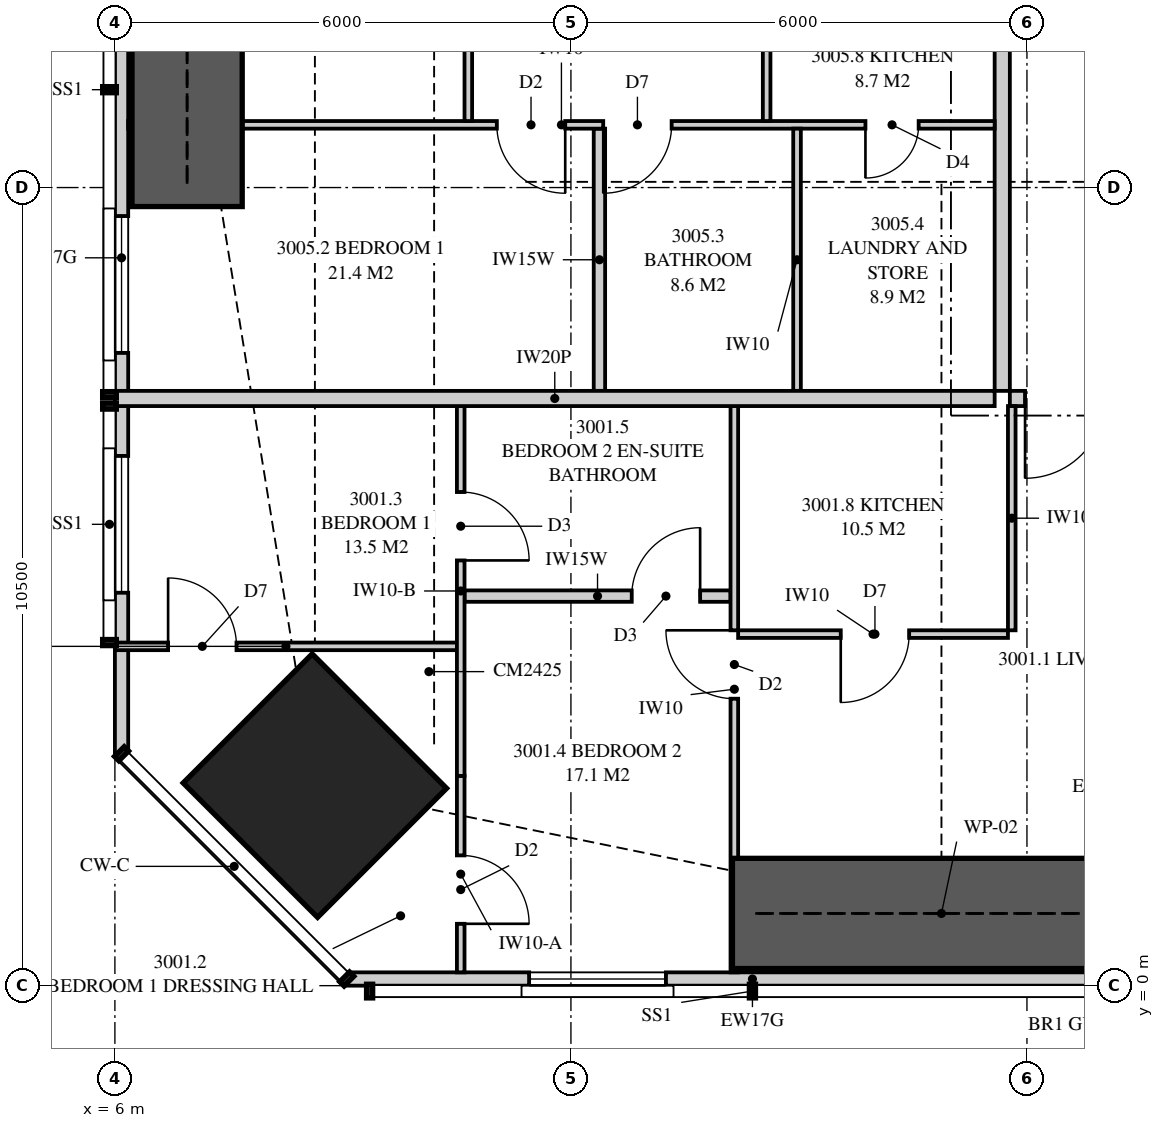
"""IFC4 building model, lengths in metres.
Left out: names, types, materials, properties, quantities, classifications, styles, units other than length and angle.
Written with IfcOpenShell. Run it as: python <this file> out.ifc"""

import sys

from ifc_helpers import new_model, si_unit, direction, frame, frame_2d, origin, origin_2d, place, context, subcontext, project, spatial, polyline, rectangle, outline, extrude, element, fill, save


model = new_model("IFC4")
c1 = context("Model", 3, precision=1e-05, world=origin(), true_north=direction((0.0, 1.0)))
c2 = subcontext(c1, "Body", "Model", "MODEL_VIEW")
j1 = project(units=[si_unit("LENGTHUNIT", "METRE"), si_unit("PLANEANGLEUNIT", "RADIAN")], contexts=[c1])
p1 = place(None, origin())
s1 = spatial("IfcSite", under=j1, at=p1, CompositionType="ELEMENT")
p2 = place(p1, origin())
s2 = spatial("IfcBuilding", under=s1, at=p2, CompositionType="ELEMENT")
p3 = place(p2, frame((0.0, 0.0, 111.55)))
s3 = spatial("IfcBuildingStorey", under=s2, at=p3, CompositionType="ELEMENT", Elevation=111.55)
p4 = place(p3, frame((8.631, 2.631, 0.0), z_axis=(0.0, 0.0, 1.0), x_axis=(0.707106781187, 0.707106781187, 0.0)))
e1 = element("IfcColumn", 1, at=p4, inside=s3, PredefinedType="COLUMN", context=c2, shape_type="SweptSolid", body=[
    extrude(rectangle(XDim=2.4, YDim=2.5, at=origin_2d()), origin(), (0.0, 0.0, 1.0), 3.35),
])
p5 = place(p3, frame((9.051, 0.087, 0.0), z_axis=(0.0, 0.0, 1.0), x_axis=(1.0, 0.0, 0.0)))
e2 = element("IfcWall", 2, at=p5, inside=s3, PredefinedType="SOLIDWALL", context=c2, shape_type="SweptSolid", body=[
    extrude(outline(polyline([(0.0, 0.0), (10.674, 0.0), (10.674, 2.15), (7.824, 2.15), (7.824, 3.11), (7.666, 3.11), (7.666, 2.15), (7.62, 2.15), (7.62, 3.11), (0.0, 3.11), (0.0, 0.0)])), frame((0.0, 0.087, 0.0), z_axis=(0.0, -1.0, 0.0), x_axis=(1.0, 0.0, 0.0)), (0.0, 0.0, 1.0), 0.175),
])
p6 = place(p5, frame((2.399, 0.0, 0.4)))
e3 = element("IfcOpeningElement", 3, at=p6, cuts=e2, PredefinedType="OPENING", context=c2, shape_type="SweptSolid", body=[
    extrude(rectangle(XDim=1.8, YDim=1.7, at=frame_2d((0.9, 0.85))), frame((0.0, 0.097, 0.0), z_axis=(0.0, -1.0, 0.0), x_axis=(1.0, 0.0, 0.0)), (0.0, 0.0, 1.0), 0.195),
])
p7 = place(p3, frame((6.087, 16.1, 0.0), z_axis=(0.0, 0.0, 1.0), x_axis=(0.0, -1.0, 0.0)))
e4 = element("IfcWall", 4, at=p7, inside=s3, PredefinedType="SOLIDWALL", context=c2, shape_type="SweptSolid", body=[
    extrude(outline(polyline([(0.0, 0.0), (13.049, 0.0), (13.049, 3.11), (3.319, 3.11), (3.319, 2.15), (3.226, 2.15), (3.226, 3.11), (3.1, 3.11), (3.1, 2.15), (0.0, 2.15), (0.0, 0.0)])), frame((0.0, 0.087, 0.0), z_axis=(0.0, -1.0, 0.0), x_axis=(1.0, 0.0, 0.0)), (0.0, 0.0, 1.0), 0.175),
])
p8 = place(p7, frame((5.975, 0.0, 0.4)))
e5 = element("IfcOpeningElement", 5, at=p8, cuts=e4, PredefinedType="OPENING", context=c2, shape_type="SweptSolid", body=[
    extrude(rectangle(XDim=1.8, YDim=1.7, at=frame_2d((0.9, 0.85))), frame((0.0, 0.097, 0.0), z_axis=(0.0, -1.0, 0.0), x_axis=(1.0, 0.0, 0.0)), (0.0, 0.0, 1.0), 0.195),
])
p9 = place(p7, frame((9.131, 0.0, 0.4)))
e6 = element("IfcOpeningElement", 6, at=p9, cuts=e4, PredefinedType="OPENING", context=c2, shape_type="SweptSolid", body=[
    extrude(rectangle(XDim=1.8, YDim=1.7, at=frame_2d((0.9, 0.85))), frame((0.0, 0.097, 0.0), z_axis=(0.0, -1.0, 0.0), x_axis=(1.0, 0.0, 0.0)), (0.0, 0.0, 1.0), 0.195),
])
p10 = place(p3, frame((17.775, 7.725, 0.0), z_axis=(0.0, 0.0, 1.0), x_axis=(1.0, 0.0, 0.0)))
e7 = element("IfcWall", 7, at=p10, inside=s3, PredefinedType="PARTITIONING", context=c2, shape_type="SweptSolid", body=[
    extrude(rectangle(XDim=8.225, YDim=0.2, at=frame_2d((4.113, 0.0))), origin(), (0.0, 0.0, 1.0), 3.11),
])
p11 = place(p10, frame((0.2, 0.0, 0.0)))
e8 = element("IfcOpeningElement", 8, at=p11, cuts=e7, PredefinedType="OPENING", context=c2, shape_type="SweptSolid", body=[
    extrude(rectangle(XDim=1.05, YDim=2.2, at=frame_2d((0.525, 1.1))), frame((0.0, 0.11, 0.0), z_axis=(0.0, -1.0, 0.0), x_axis=(1.0, 0.0, 0.0)), (0.0, 0.0, 1.0), 0.22),
])
p12 = place(p3, frame((10.55, 0.175, 0.0), z_axis=(0.0, 0.0, 1.0), x_axis=(0.0, 1.0, 0.0)))
e9 = element("IfcWall", 9, at=p12, inside=s3, PredefinedType="PARTITIONING", context=c2, shape_type="SweptSolid", body=[
    extrude(outline(polyline([(0.0, 0.0), (2.585, 0.0), (2.585, 2.15), (1.188, 2.15), (1.188, 3.11), (0.0, 3.11), (0.0, 0.0)])), frame((0.0, 0.05, 0.0), z_axis=(0.0, -1.0, 0.0), x_axis=(1.0, 0.0, 0.0)), (0.0, 0.0, 1.0), 0.1),
])
p13 = place(p12, frame((0.639, 0.0, 0.0)))
e10 = element("IfcOpeningElement", 10, at=p13, cuts=e9, PredefinedType="OPENING", context=c2, shape_type="SweptSolid", body=[
    extrude(rectangle(XDim=0.9, YDim=2.1, at=frame_2d((0.45, 1.05))), frame((0.0, 0.06, 0.0), z_axis=(0.0, -1.0, 0.0), x_axis=(1.0, 0.0, 0.0)), (0.0, 0.0, 1.0), 0.12),
])
p14 = place(p3, frame((10.55, 2.76, 0.0), z_axis=(0.0, 0.0, 1.0), x_axis=(0.0, 1.0, 0.0)))
e11 = element("IfcWall", 11, at=p14, inside=s3, PredefinedType="PARTITIONING", context=c2, shape_type="SweptSolid", body=[
    extrude(outline(polyline([(0.0, 0.0), (4.865, 0.0), (4.865, 2.51), (0.358, 2.51), (0.358, 2.15), (0.0, 2.15), (0.0, 0.0)])), frame((0.0, 0.05, 0.0), z_axis=(0.0, -1.0, 0.0), x_axis=(1.0, 0.0, 0.0)), (0.0, 0.0, 1.0), 0.1),
])
p15 = place(p14, frame((2.834, 0.0, 0.0)))
e12 = element("IfcOpeningElement", 12, at=p15, cuts=e11, PredefinedType="OPENING", context=c2, shape_type="SweptSolid", body=[
    extrude(rectangle(XDim=0.9, YDim=2.1, at=frame_2d((0.45, 1.05))), frame((0.0, 0.06, 0.0), z_axis=(0.0, -1.0, 0.0), x_axis=(1.0, 0.0, 0.0)), (0.0, 0.0, 1.0), 0.12),
])
p16 = place(p3, frame((14.15, 0.175, 0.0), z_axis=(0.0, 0.0, 1.0), x_axis=(0.0, 1.0, 0.0)))
e13 = element("IfcWall", 13, at=p16, inside=s3, PredefinedType="PARTITIONING", context=c2, shape_type="SweptSolid", body=[
    extrude(outline(polyline([(0.0, 0.0), (7.45, 0.0), (7.45, 3.11), (2.208, 3.11), (2.208, 2.15), (0.453, 2.15), (0.453, 3.11), (0.0, 3.11), (0.0, 0.0)])), frame((0.0, 0.05, 0.0), z_axis=(0.0, -1.0, 0.0), x_axis=(1.0, 0.0, 0.0)), (0.0, 0.0, 1.0), 0.1),
])
p17 = place(p16, frame((3.6, 0.0, 0.0)))
e14 = element("IfcOpeningElement", 14, at=p17, cuts=e13, PredefinedType="OPENING", context=c2, shape_type="SweptSolid", body=[
    extrude(rectangle(XDim=0.9, YDim=2.1, at=frame_2d((0.45, 1.05))), frame((0.0, 0.06, 0.0), z_axis=(0.0, -1.0, 0.0), x_axis=(1.0, 0.0, 0.0)), (0.0, 0.0, 1.0), 0.12),
])
p18 = place(p3, frame((6.0, 4.464, 0.0), z_axis=(0.0, 0.0, 1.0), x_axis=(1.0, 0.0, 0.0)))
e15 = element("IfcWall", 15, at=p18, inside=s3, PredefinedType="PARTITIONING", context=c2, shape_type="SweptSolid", body=[
    extrude(outline(polyline([(0.0, 0.0), (4.5, 0.0), (4.5, 3.11), (4.5, 2.51), (3.206, 2.51), (3.206, 2.15), (1.463, 2.15), (1.463, 3.11), (0.0, 3.11), (0.0, 0.0)])), frame((0.0, 0.05, 0.0), z_axis=(0.0, -1.0, 0.0), x_axis=(1.0, 0.0, 0.0)), (0.0, 0.0, 1.0), 0.1),
])
p19 = place(p18, frame((0.7, 0.0, 0.0)))
e16 = element("IfcOpeningElement", 16, at=p19, cuts=e15, PredefinedType="OPENING", context=c2, shape_type="SweptSolid", body=[
    extrude(rectangle(XDim=0.9, YDim=2.1, at=frame_2d((0.45, 1.05))), frame((0.0, 0.06, 0.0), z_axis=(0.0, -1.0, 0.0), x_axis=(1.0, 0.0, 0.0)), (0.0, 0.0, 1.0), 0.12),
])
p20 = place(p3, frame((10.6, 5.125, 0.0), z_axis=(0.0, 0.0, 1.0), x_axis=(1.0, 0.0, 0.0)))
e17 = element("IfcWall", 17, at=p20, inside=s3, PredefinedType="PLUMBINGWALL", context=c2, shape_type="SweptSolid", body=[
    extrude(outline(polyline([(0.0, 0.0), (3.5, 0.0), (3.5, 3.11), (0.885, 3.11), (0.885, 2.51), (0.0, 2.51), (0.0, 3.11), (0.0, 0.0)])), frame((0.0, 0.075, 0.0), z_axis=(0.0, -1.0, 0.0), x_axis=(1.0, 0.0, 0.0)), (0.0, 0.0, 1.0), 0.15),
])
p21 = place(p20, frame((2.2, 0.0, 0.0)))
e18 = element("IfcOpeningElement", 18, at=p21, cuts=e17, PredefinedType="OPENING", context=c2, shape_type="SweptSolid", body=[
    extrude(rectangle(XDim=0.9, YDim=2.1, at=frame_2d((0.45, 1.05))), frame((0.0, 0.085, 0.0), z_axis=(0.0, -1.0, 0.0), x_axis=(1.0, 0.0, 0.0)), (0.0, 0.0, 1.0), 0.17),
])
p22 = place(p3, frame((14.2, 4.625, 0.0), z_axis=(0.0, 0.0, 1.0), x_axis=(1.0, 0.0, 0.0)))
e19 = element("IfcWall", 19, at=p22, inside=s3, PredefinedType="PARTITIONING", context=c2, shape_type="SweptSolid", body=[
    extrude(outline(polyline([(0.0, 0.0), (3.55, 0.0), (3.55, 3.11), (2.962, 3.11), (2.962, 2.541), (2.388, 2.541), (2.388, 3.11), (0.0, 3.11), (0.0, 0.0)])), frame((0.0, 0.05, 0.0), z_axis=(0.0, -1.0, 0.0), x_axis=(1.0, 0.0, 0.0)), (0.0, 0.0, 1.0), 0.1),
])
p23 = place(p22, frame((1.35, 0.0, 0.0)))
e20 = element("IfcOpeningElement", 20, at=p23, cuts=e19, PredefinedType="OPENING", context=c2, shape_type="SweptSolid", body=[
    extrude(rectangle(XDim=0.9, YDim=2.1, at=frame_2d((0.45, 1.05))), frame((0.0, 0.06, 0.0), z_axis=(0.0, -1.0, 0.0), x_axis=(1.0, 0.0, 0.0)), (0.0, 0.0, 1.0), 0.12),
])
p24 = place(p3, frame((17.8, 4.675, 0.0), z_axis=(0.0, 0.0, 1.0), x_axis=(0.0, 1.0, 0.0)))
e21 = element("IfcWall", 21, at=p24, inside=s3, PredefinedType="PARTITIONING", context=c2, shape_type="SweptSolid", body=[
    extrude(rectangle(XDim=2.95, YDim=0.1, at=frame_2d((1.475, 0.0))), origin(), (0.0, 0.0, 1.0), 3.11),
])
p25 = place(p3, frame((6.0, 7.725, 0.0), z_axis=(0.0, 0.0, 1.0), x_axis=(1.0, 0.0, 0.0)))
e22 = element("IfcWall", 22, at=p25, inside=s3, PredefinedType="PARTITIONING", context=c2, shape_type="SweptSolid", body=[
    extrude(outline(polyline([(0.0, 0.0), (11.575, 0.0), (11.575, 3.11), (11.212, 3.11), (11.212, 2.541), (10.538, 2.541), (10.538, 3.11), (5.51, 3.11), (5.51, 2.51), (2.969, 2.51), (2.969, 2.541), (2.727, 2.541), (2.727, 2.15), (0.884, 2.15), (0.884, 3.11), (0.0, 3.11), (0.0, 0.0)])), frame((0.0, 0.1, 0.0), z_axis=(0.0, -1.0, 0.0), x_axis=(1.0, 0.0, 0.0)), (0.0, 0.0, 1.0), 0.2),
])
p26 = place(p3, frame((17.675, 7.825, 0.0), z_axis=(0.0, 0.0, 1.0), x_axis=(0.0, 1.0, 0.0)))
e23 = element("IfcWall", 23, at=p26, inside=s3, PredefinedType="PARTITIONING", context=c2, shape_type="SweptSolid", body=[
    extrude(outline(polyline([(0.0, 0.0), (6.637, 0.0), (6.637, 3.11), (3.087, 3.11), (3.087, 2.541), (2.413, 2.541), (2.413, 3.11), (0.0, 3.11), (0.0, 0.0)])), frame((0.0, 0.1, 0.0), z_axis=(0.0, -1.0, 0.0), x_axis=(1.0, 0.0, 0.0)), (0.0, 0.0, 1.0), 0.2),
])
p27 = place(p3, frame((6.175, 11.325, 0.0), z_axis=(0.0, 0.0, 1.0), x_axis=(1.0, 0.0, 0.0)))
e24 = element("IfcWall", 24, at=p27, inside=s3, PredefinedType="PARTITIONING", context=c2, shape_type="SweptSolid", body=[
    extrude(outline(polyline([(0.175, 3.11), (0.0, 3.11), (0.0, 0.0), (0.529, 0.0), (0.529, 0.325), (1.021, 0.325), (1.021, 0.0), (11.4, 0.0), (11.4, 3.11), (5.285, 3.11), (5.285, 2.51), (2.765, 2.51), (2.765, 3.11), (2.744, 3.11), (2.744, 2.541), (2.169, 2.541), (2.169, 3.11), (1.918, 3.11), (1.918, 2.15), (1.021, 2.15), (1.021, 1.825), (0.529, 1.825), (0.529, 2.15), (0.175, 2.15), (0.175, 3.11)])), frame((0.0, 0.05, 0.0), z_axis=(0.0, -1.0, 0.0), x_axis=(1.0, 0.0, 0.0)), (0.0, 0.0, 1.0), 0.1),
])
p28 = place(p27, frame((4.85, 0.0, 0.0)))
e25 = element("IfcOpeningElement", 25, at=p28, cuts=e24, PredefinedType="OPENING", context=c2, shape_type="SweptSolid", body=[
    extrude(rectangle(XDim=0.9, YDim=2.1, at=frame_2d((0.45, 1.05))), frame((0.0, 0.06, 0.0), z_axis=(0.0, -1.0, 0.0), x_axis=(1.0, 0.0, 0.0)), (0.0, 0.0, 1.0), 0.12),
])
p29 = place(p27, frame((6.25, 0.0, 0.0)))
e26 = element("IfcOpeningElement", 26, at=p29, cuts=e24, PredefinedType="OPENING", context=c2, shape_type="SweptSolid", body=[
    extrude(rectangle(XDim=0.9, YDim=2.1, at=frame_2d((0.45, 1.05))), frame((0.0, 0.06, 0.0), z_axis=(0.0, -1.0, 0.0), x_axis=(1.0, 0.0, 0.0)), (0.0, 0.0, 1.0), 0.12),
])
p30 = place(p27, frame((9.7, 0.0, 0.0)))
e27 = element("IfcOpeningElement", 27, at=p30, cuts=e24, PredefinedType="OPENING", context=c2, shape_type="SweptSolid", body=[
    extrude(rectangle(XDim=0.7, YDim=2.1, at=frame_2d((0.35, 1.05))), frame((0.0, 0.06, 0.0), z_axis=(0.0, -1.0, 0.0), x_axis=(1.0, 0.0, 0.0)), (0.0, 0.0, 1.0), 0.12),
])
p31 = place(p3, frame((12.375, 7.825, 0.0), z_axis=(0.0, 0.0, 1.0), x_axis=(0.0, 1.0, 0.0)))
e28 = element("IfcWall", 28, at=p31, inside=s3, PredefinedType="PLUMBINGWALL", context=c2, shape_type="SweptSolid", body=[
    extrude(outline(polyline([(0.0, 0.0), (3.45, 0.0), (3.45, 3.11), (3.062, 3.11), (3.062, 2.541), (2.438, 2.541), (2.438, 3.11), (0.0, 3.11), (0.0, 0.0)])), frame((0.0, 0.075, 0.0), z_axis=(0.0, -1.0, 0.0), x_axis=(1.0, 0.0, 0.0)), (0.0, 0.0, 1.0), 0.15),
])
p32 = place(p3, frame((14.975, 7.825, 0.0), z_axis=(0.0, 0.0, 1.0), x_axis=(0.0, 1.0, 0.0)))
e29 = element("IfcWall", 29, at=p32, inside=s3, PredefinedType="PARTITIONING", context=c2, shape_type="SweptSolid", body=[
    extrude(outline(polyline([(0.0, 0.0), (3.45, 0.0), (3.45, 3.11), (3.037, 3.11), (3.037, 2.541), (2.463, 2.541), (2.463, 3.11), (0.0, 3.11), (0.0, 0.0)])), frame((0.0, 0.05, 0.0), z_axis=(0.0, -1.0, 0.0), x_axis=(1.0, 0.0, 0.0)), (0.0, 0.0, 1.0), 0.1),
])
p33 = place(p3, frame((14.575, 11.375, 0.0), z_axis=(0.0, 0.0, 1.0), x_axis=(0.0, 1.0, 0.0)))
e30 = element("IfcWall", 30, at=p33, inside=s3, PredefinedType="PARTITIONING", context=c2, shape_type="SweptSolid", body=[
    extrude(rectangle(XDim=2.95, YDim=0.1, at=frame_2d((1.475, 0.0))), origin(), (0.0, 0.0, 1.0), 3.11),
])
p34 = place(p33, frame((1.05, 0.0, 0.0)))
e31 = element("IfcOpeningElement", 31, at=p34, cuts=e30, PredefinedType="OPENING", context=c2, shape_type="SweptSolid", body=[
    extrude(rectangle(XDim=0.9, YDim=2.1, at=frame_2d((0.45, 1.05))), frame((0.0, 0.06, 0.0), z_axis=(0.0, -1.0, 0.0), x_axis=(1.0, 0.0, 0.0)), (0.0, 0.0, 1.0), 0.12),
])
p35 = place(p3, frame((10.65, 11.375, 0.0), z_axis=(0.0, 0.0, 1.0), x_axis=(0.0, 1.0, 0.0)))
e32 = element("IfcWall", 32, at=p35, inside=s3, PredefinedType="PARTITIONING", context=c2, shape_type="SweptSolid", body=[
    extrude(outline(polyline([(0.0, 0.0), (7.775, 0.0), (7.775, 3.11), (7.775, 2.51), (1.685, 2.51), (0.0, 2.51), (0.0, 3.11), (0.0, 0.0)])), frame((0.0, 0.05, 0.0), z_axis=(0.0, -1.0, 0.0), x_axis=(1.0, 0.0, 0.0)), (0.0, 0.0, 1.0), 0.1),
])
p36 = place(p35, frame((3.387, 0.0, 0.0)))
e33 = element("IfcOpeningElement", 33, at=p36, cuts=e32, PredefinedType="OPENING", context=c2, shape_type="SweptSolid", body=[
    extrude(rectangle(XDim=1.0, YDim=2.1, at=frame_2d((0.5, 1.05))), frame((0.0, 0.06, 0.0), z_axis=(0.0, -1.0, 0.0), x_axis=(1.0, 0.0, 0.0)), (0.0, 0.0, 1.0), 0.12),
])
for number, where, z_axis, x_axis in (
    (34, (14.125, 0.95, 0.0), (0.0, 0.0, 1.0), (1.0, 0.0, 0.0)),
    (35, (6.95, 10.25, 0.0), (0.0, 0.0, 1.0), (0.0, 1.0, 0.0)),
):
    element("IfcWall", number, at=place(p3, frame(where, z_axis=z_axis, x_axis=x_axis)), inside=s3, PredefinedType="SHEAR", context=c2, shape_type="SweptSolid", body=[
        extrude(rectangle(XDim=5.5, YDim=1.45, at=frame_2d((2.75, 0.0))), origin(), (0.0, 0.0, 1.0), 3.35),
    ])
p37 = place(p6, origin())
e36 = element("IfcWindow", 36, at=p37, inside=s3, PartitioningType="SINGLE_PANEL", PredefinedType="WINDOW", context=c2, shape_type="SweptSolid", body=[
    extrude(rectangle(XDim=1.8, YDim=1.7, at=frame_2d((0.9, 0.85))), frame((0.0, 0.03, 0.0), z_axis=(0.0, -1.0, 0.0), x_axis=(1.0, 0.0, 0.0)), (0.0, 0.0, 1.0), 0.06),
])
fill(e3, e36)
p38 = place(p8, origin())
e37 = element("IfcWindow", 37, at=p38, inside=s3, PartitioningType="SINGLE_PANEL", PredefinedType="WINDOW", context=c2, shape_type="SweptSolid", body=[
    extrude(rectangle(XDim=1.8, YDim=1.7, at=frame_2d((0.9, 0.85))), frame((0.0, 0.03, 0.0), z_axis=(0.0, -1.0, 0.0), x_axis=(1.0, 0.0, 0.0)), (0.0, 0.0, 1.0), 0.06),
])
fill(e5, e37)
p39 = place(p9, origin())
e38 = element("IfcWindow", 38, at=p39, inside=s3, PartitioningType="SINGLE_PANEL", PredefinedType="WINDOW", context=c2, shape_type="SweptSolid", body=[
    extrude(rectangle(XDim=1.8, YDim=1.7, at=frame_2d((0.9, 0.85))), frame((0.0, 0.03, 0.0), z_axis=(0.0, -1.0, 0.0), x_axis=(1.0, 0.0, 0.0)), (0.0, 0.0, 1.0), 0.06),
])
fill(e6, e38)
p40 = place(p11, frame((1.05, 0.0, 0.0), z_axis=(0.0, 0.0, 1.0), x_axis=(-1.0, 0.0, 0.0)))
e39 = element("IfcDoor", 39, at=p40, inside=s3, OperationType="SINGLE_SWING_RIGHT", PredefinedType="DOOR", context=c2, shape_type="SweptSolid", body=[
    extrude(rectangle(XDim=1.05, YDim=2.2, at=frame_2d((0.525, 1.1))), frame((0.0, 0.025, 0.0), z_axis=(0.0, -1.0, 0.0), x_axis=(1.0, 0.0, 0.0)), (0.0, 0.0, 1.0), 0.05),
])
fill(e8, e39)
p41 = place(p19, origin())
e40 = element("IfcDoor", 40, at=p41, inside=s3, OperationType="SINGLE_SWING_LEFT", PredefinedType="DOOR", context=c2, shape_type="SweptSolid", body=[
    extrude(rectangle(XDim=0.9, YDim=2.1, at=frame_2d((0.45, 1.05))), frame((0.0, 0.025, 0.0), z_axis=(0.0, -1.0, 0.0), x_axis=(1.0, 0.0, 0.0)), (0.0, 0.0, 1.0), 0.05),
])
fill(e16, e40)
p42 = place(p13, frame((0.9, 0.0, 0.0), z_axis=(0.0, 0.0, 1.0), x_axis=(-1.0, 0.0, 0.0)))
e41 = element("IfcDoor", 41, at=p42, inside=s3, OperationType="SINGLE_SWING_RIGHT", PredefinedType="DOOR", context=c2, shape_type="SweptSolid", body=[
    extrude(rectangle(XDim=0.9, YDim=2.1, at=frame_2d((0.45, 1.05))), frame((0.0, 0.025, 0.0), z_axis=(0.0, -1.0, 0.0), x_axis=(1.0, 0.0, 0.0)), (0.0, 0.0, 1.0), 0.05),
])
fill(e10, e41)
p43 = place(p17, origin())
e42 = element("IfcDoor", 42, at=p43, inside=s3, OperationType="SINGLE_SWING_RIGHT", PredefinedType="DOOR", context=c2, shape_type="SweptSolid", body=[
    extrude(rectangle(XDim=0.9, YDim=2.1, at=frame_2d((0.45, 1.05))), frame((0.0, 0.025, 0.0), z_axis=(0.0, -1.0, 0.0), x_axis=(1.0, 0.0, 0.0)), (0.0, 0.0, 1.0), 0.05),
])
fill(e14, e42)
p44 = place(p21, origin())
e43 = element("IfcDoor", 43, at=p44, inside=s3, OperationType="SINGLE_SWING_RIGHT", PredefinedType="DOOR", context=c2, shape_type="SweptSolid", body=[
    extrude(rectangle(XDim=0.9, YDim=2.1, at=frame_2d((0.45, 1.05))), frame((0.0, 0.025, 0.0), z_axis=(0.0, -1.0, 0.0), x_axis=(1.0, 0.0, 0.0)), (0.0, 0.0, 1.0), 0.05),
])
fill(e18, e43)
p45 = place(p15, frame((0.9, 0.0, 0.0), z_axis=(0.0, 0.0, 1.0), x_axis=(-1.0, 0.0, 0.0)))
e44 = element("IfcDoor", 44, at=p45, inside=s3, OperationType="SINGLE_SWING_RIGHT", PredefinedType="DOOR", context=c2, shape_type="SweptSolid", body=[
    extrude(rectangle(XDim=0.9, YDim=2.1, at=frame_2d((0.45, 1.05))), frame((0.0, 0.025, 0.0), z_axis=(0.0, -1.0, 0.0), x_axis=(1.0, 0.0, 0.0)), (0.0, 0.0, 1.0), 0.05),
])
fill(e12, e44)
p46 = place(p23, frame((0.9, 0.0, 0.0), z_axis=(0.0, 0.0, 1.0), x_axis=(-1.0, 0.0, 0.0)))
e45 = element("IfcDoor", 45, at=p46, inside=s3, OperationType="SINGLE_SWING_RIGHT", PredefinedType="DOOR", context=c2, shape_type="SweptSolid", body=[
    extrude(rectangle(XDim=0.9, YDim=2.1, at=frame_2d((0.45, 1.05))), frame((0.0, 0.025, 0.0), z_axis=(0.0, -1.0, 0.0), x_axis=(1.0, 0.0, 0.0)), (0.0, 0.0, 1.0), 0.05),
])
fill(e20, e45)
p47 = place(p28, frame((0.9, 0.0, 0.0), z_axis=(0.0, 0.0, 1.0), x_axis=(-1.0, 0.0, 0.0)))
e46 = element("IfcDoor", 46, at=p47, inside=s3, OperationType="SINGLE_SWING_LEFT", PredefinedType="DOOR", context=c2, shape_type="SweptSolid", body=[
    extrude(rectangle(XDim=0.9, YDim=2.1, at=frame_2d((0.45, 1.05))), frame((0.0, 0.025, 0.0), z_axis=(0.0, -1.0, 0.0), x_axis=(1.0, 0.0, 0.0)), (0.0, 0.0, 1.0), 0.05),
])
fill(e25, e46)
p48 = place(p29, frame((0.9, 0.0, 0.0), z_axis=(0.0, 0.0, 1.0), x_axis=(-1.0, 0.0, 0.0)))
e47 = element("IfcDoor", 47, at=p48, inside=s3, OperationType="SINGLE_SWING_RIGHT", PredefinedType="DOOR", context=c2, shape_type="SweptSolid", body=[
    extrude(rectangle(XDim=0.9, YDim=2.1, at=frame_2d((0.45, 1.05))), frame((0.0, 0.025, 0.0), z_axis=(0.0, -1.0, 0.0), x_axis=(1.0, 0.0, 0.0)), (0.0, 0.0, 1.0), 0.05),
])
fill(e26, e47)
p49 = place(p30, frame((0.7, 0.0, 0.0), z_axis=(0.0, 0.0, 1.0), x_axis=(-1.0, 0.0, 0.0)))
e48 = element("IfcDoor", 48, at=p49, inside=s3, OperationType="SINGLE_SWING_RIGHT", PredefinedType="DOOR", context=c2, shape_type="SweptSolid", body=[
    extrude(rectangle(XDim=0.7, YDim=2.1, at=frame_2d((0.35, 1.05))), frame((0.0, 0.025, 0.0), z_axis=(0.0, -1.0, 0.0), x_axis=(1.0, 0.0, 0.0)), (0.0, 0.0, 1.0), 0.05),
])
fill(e27, e48)
save(model, sys.argv[1])
